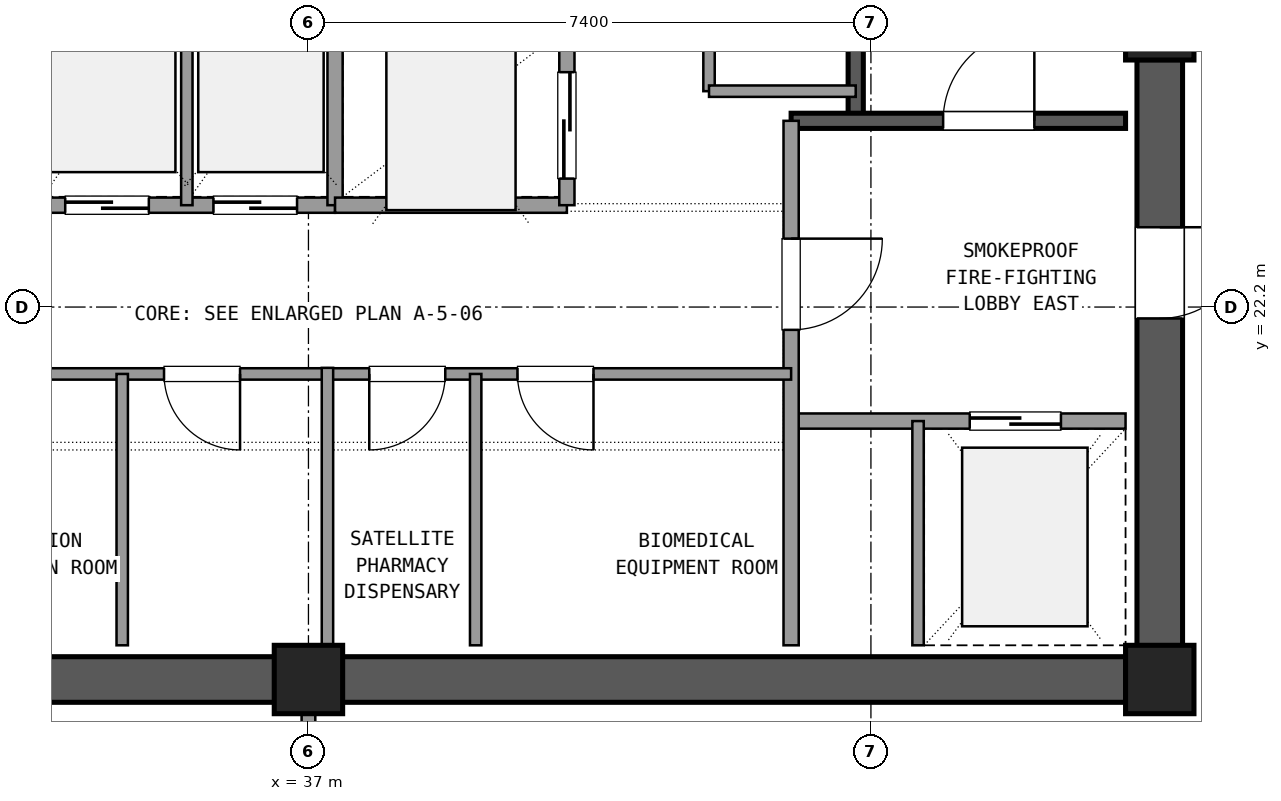
"""IFC4 building model, lengths in metres.
Left out: names, types, materials, properties, quantities, classifications, styles, units other than length and angle.
Written with IfcOpenShell. Run it as: python <this file> out.ifc"""

import sys

from ifc_helpers import new_model, si_unit, direction, frame, frame_2d, origin, origin_2d, place, context, subcontext, project, spatial, rectangle, extrude, element, fill, save


model = new_model("IFC4")
c1 = context("Model", 3, precision=1e-05, world=origin(), true_north=direction((0.0, 1.0)))
c2 = subcontext(c1, "Body", "Model", "MODEL_VIEW")
j1 = project(units=[si_unit("LENGTHUNIT", "METRE"), si_unit("PLANEANGLEUNIT", "RADIAN")], contexts=[c1])
p1 = place(None, origin())
s1 = spatial("IfcSite", under=j1, at=p1, CompositionType="ELEMENT")
p2 = place(p1, origin())
s2 = spatial("IfcBuilding", under=s1, at=p2, CompositionType="ELEMENT")
p3 = place(p2, frame((0.0, 0.0, 246.42)))
s3 = spatial("IfcBuildingStorey", under=s2, at=p3, CompositionType="ELEMENT", Elevation=246.42)
for number, where, z_axis, x_axis in (
    (1, (37.0, 17.3, 0.0), (0.0, 0.0, 1.0), (1.0, 0.0, 0.0)),
    (2, (48.2, 17.3, 0.0), (0.0, 0.0, 1.0), (1.0, 0.0, 0.0)),
    (3, (48.2, 25.9, 0.0), (0.0, 0.0, 1.0), (1.0, 0.0, 0.0)),
):
    element("IfcColumn", number, at=place(p3, frame(where, z_axis=z_axis, x_axis=x_axis)), inside=s3, PredefinedType="COLUMN", context=c2, shape_type="SweptSolid", body=[
        extrude(rectangle(XDim=0.9, YDim=0.9, at=origin_2d()), origin(), (0.0, 0.0, 1.0), 3.6),
    ])
for number, where, z_axis, x_axis in (
    (4, (26.245, 17.3, 0.0), (0.0, 0.0, 1.0), (1.0, 0.0, 0.0)),
    (5, (37.445, 17.3, 0.0), (0.0, 0.0, 1.0), (1.0, 0.0, 0.0)),
):
    element("IfcWall", number, at=place(p3, frame(where, z_axis=z_axis, x_axis=x_axis)), inside=s3, PredefinedType="SHEAR", context=c2, shape_type="SweptSolid", body=[
        extrude(rectangle(XDim=10.31, YDim=0.6, at=frame_2d((5.155, 0.0))), origin(), (0.0, 0.0, 1.0), 3.32),
    ])
p4 = place(p3, frame((48.2, 17.745, 0.0), z_axis=(0.0, 0.0, 1.0), x_axis=(0.0, 1.0, 0.0)))
e6 = element("IfcWall", 6, at=p4, inside=s3, PredefinedType="SHEAR", context=c2, shape_type="SweptSolid", body=[
    extrude(rectangle(XDim=7.71, YDim=0.6, at=frame_2d((3.855, 0.0))), origin(), (0.0, 0.0, 1.0), 3.32),
])
p5 = place(p4, frame((4.305, 0.0, 0.0)))
e7 = element("IfcOpeningElement", 7, at=p5, cuts=e6, PredefinedType="OPENING", context=c2, shape_type="SweptSolid", body=[
    extrude(rectangle(XDim=1.2, YDim=2.15, at=frame_2d((0.6, 1.075))), frame((0.0, 0.31, 0.0), z_axis=(0.0, -1.0, 0.0), x_axis=(1.0, 0.0, 0.0)), (0.0, 0.0, 1.0), 0.62),
])
p6 = place(p3, frame((44.2, 24.65, 0.0), z_axis=(0.0, 0.0, 1.0), x_axis=(0.0, 1.0, 0.0)))
e8 = element("IfcWall", 8, at=p6, inside=s3, PredefinedType="SHEAR", context=c2, shape_type="SweptSolid", body=[
    extrude(rectangle(XDim=9.4, YDim=0.2, at=frame_2d((4.7, 0.0))), origin(), (0.0, 0.0, 1.0), 3.32),
])
p7 = place(p3, frame((43.35, 24.65, 0.0), z_axis=(0.0, 0.0, 1.0), x_axis=(1.0, 0.0, 0.0)))
e9 = element("IfcWall", 9, at=p7, inside=s3, PredefinedType="SHEAR", context=c2, shape_type="SweptSolid", body=[
    extrude(rectangle(XDim=4.4, YDim=0.2, at=frame_2d((2.2, 0.0))), origin(), (0.0, 0.0, 1.0), 3.32),
])
p8 = place(p7, frame((2.0, 0.0, 0.0)))
e10 = element("IfcOpeningElement", 10, at=p8, cuts=e9, PredefinedType="OPENING", context=c2, shape_type="SweptSolid", body=[
    extrude(rectangle(XDim=1.2, YDim=2.15, at=frame_2d((0.6, 1.075))), frame((0.0, 0.11, 0.0), z_axis=(0.0, -1.0, 0.0), x_axis=(1.0, 0.0, 0.0)), (0.0, 0.0, 1.0), 0.22),
])
p9 = place(p3, frame((43.35, 20.7, 0.0), z_axis=(0.0, 0.0, 1.0), x_axis=(1.0, 0.0, 0.0)))
e11 = element("IfcWall", 11, at=p9, inside=s3, PredefinedType="SOLIDWALL", context=c2, shape_type="SweptSolid", body=[
    extrude(rectangle(XDim=4.4, YDim=0.2, at=frame_2d((2.2, 0.0))), origin(), (0.0, 0.0, 1.0), 2.61),
])
p10 = place(p9, frame((2.35, 0.0, 0.0)))
e12 = element("IfcOpeningElement", 12, at=p10, cuts=e11, PredefinedType="OPENING", context=c2, shape_type="SweptSolid", body=[
    extrude(rectangle(XDim=1.2, YDim=2.15, at=frame_2d((0.6, 1.075))), frame((0.0, 0.11, 0.0), z_axis=(0.0, -1.0, 0.0), x_axis=(1.0, 0.0, 0.0)), (0.0, 0.0, 1.0), 0.22),
])
p11 = place(p3, frame((43.35, 17.75, 0.0), z_axis=(0.0, 0.0, 1.0), x_axis=(0.0, 1.0, 0.0)))
e13 = element("IfcWall", 13, at=p11, inside=s3, PredefinedType="SOLIDWALL", context=c2, shape_type="SweptSolid", body=[
    extrude(rectangle(XDim=6.9, YDim=0.2, at=frame_2d((3.45, 0.0))), origin(), (0.0, 0.0, 1.0), 2.61),
])
p12 = place(p11, frame((4.15, 0.0, 0.0)))
e14 = element("IfcOpeningElement", 14, at=p12, cuts=e13, PredefinedType="OPENING", context=c2, shape_type="SweptSolid", body=[
    extrude(rectangle(XDim=1.2, YDim=2.15, at=frame_2d((0.6, 1.075))), frame((0.0, 0.11, 0.0), z_axis=(0.0, -1.0, 0.0), x_axis=(1.0, 0.0, 0.0)), (0.0, 0.0, 1.0), 0.22),
])
p13 = place(p3, frame((45.02, 17.75, 0.0), z_axis=(0.0, 0.0, 1.0), x_axis=(0.0, 1.0, 0.0)))
e15 = element("IfcWall", 15, at=p13, inside=s3, PredefinedType="PARTITIONING", context=c2, shape_type="SweptSolid", body=[
    extrude(rectangle(XDim=2.95, YDim=0.15, at=frame_2d((1.475, 0.0))), origin(), (0.0, 0.0, 1.0), 2.61),
])
p14 = place(p3, frame((30.25, 21.32, 0.0), z_axis=(0.0, 0.0, 1.0), x_axis=(1.0, 0.0, 0.0)))
e16 = element("IfcWall", 16, at=p14, inside=s3, PredefinedType="PARTITIONING", context=c2, shape_type="SweptSolid", body=[
    extrude(rectangle(XDim=7.0, YDim=0.15, at=frame_2d((3.5, 0.0))), origin(), (0.0, 0.0, 1.0), 2.61),
])
p15 = place(p14, frame((0.7, 0.0, 0.0)))
e17 = element("IfcOpeningElement", 17, at=p15, cuts=e16, PredefinedType="OPENING", context=c2, shape_type="SweptSolid", body=[
    extrude(rectangle(XDim=1.0, YDim=2.15, at=frame_2d((0.5, 1.075))), frame((0.0, 0.085, 0.0), z_axis=(0.0, -1.0, 0.0), x_axis=(1.0, 0.0, 0.0)), (0.0, 0.0, 1.0), 0.17),
])
p16 = place(p14, frame((4.85, 0.0, 0.0)))
e18 = element("IfcOpeningElement", 18, at=p16, cuts=e16, PredefinedType="OPENING", context=c2, shape_type="SweptSolid", body=[
    extrude(rectangle(XDim=1.0, YDim=2.15, at=frame_2d((0.5, 1.075))), frame((0.0, 0.085, 0.0), z_axis=(0.0, -1.0, 0.0), x_axis=(1.0, 0.0, 0.0)), (0.0, 0.0, 1.0), 0.17),
])
p17 = place(p3, frame((34.55, 17.75, 0.0), z_axis=(0.0, 0.0, 1.0), x_axis=(0.0, 1.0, 0.0)))
e19 = element("IfcWall", 19, at=p17, inside=s3, PredefinedType="PARTITIONING", context=c2, shape_type="SweptSolid", body=[
    extrude(rectangle(XDim=3.57, YDim=0.15, at=frame_2d((1.785, 0.0))), origin(), (0.0, 0.0, 1.0), 2.61),
])
p18 = place(p3, frame((37.25, 21.32, 0.0), z_axis=(0.0, 0.0, 1.0), x_axis=(1.0, 0.0, 0.0)))
e20 = element("IfcWall", 20, at=p18, inside=s3, PredefinedType="PARTITIONING", context=c2, shape_type="SweptSolid", body=[
    extrude(rectangle(XDim=6.1, YDim=0.15, at=frame_2d((3.05, 0.0))), origin(), (0.0, 0.0, 1.0), 2.61),
])
p19 = place(p18, frame((0.55, 0.0, 0.0)))
e21 = element("IfcOpeningElement", 21, at=p19, cuts=e20, PredefinedType="OPENING", context=c2, shape_type="SweptSolid", body=[
    extrude(rectangle(XDim=1.0, YDim=2.15, at=frame_2d((0.5, 1.075))), frame((0.0, 0.085, 0.0), z_axis=(0.0, -1.0, 0.0), x_axis=(1.0, 0.0, 0.0)), (0.0, 0.0, 1.0), 0.17),
])
p20 = place(p18, frame((2.5, 0.0, 0.0)))
e22 = element("IfcOpeningElement", 22, at=p20, cuts=e20, PredefinedType="OPENING", context=c2, shape_type="SweptSolid", body=[
    extrude(rectangle(XDim=1.0, YDim=2.15, at=frame_2d((0.5, 1.075))), frame((0.0, 0.085, 0.0), z_axis=(0.0, -1.0, 0.0), x_axis=(1.0, 0.0, 0.0)), (0.0, 0.0, 1.0), 0.17),
])
p21 = place(p3, frame((39.2, 17.75, 0.0), z_axis=(0.0, 0.0, 1.0), x_axis=(0.0, 1.0, 0.0)))
e23 = element("IfcWall", 23, at=p21, inside=s3, PredefinedType="PARTITIONING", context=c2, shape_type="SweptSolid", body=[
    extrude(rectangle(XDim=3.57, YDim=0.15, at=frame_2d((1.785, 0.0))), origin(), (0.0, 0.0, 1.0), 2.61),
])
p22 = place(p3, frame((37.25, 17.75, 0.0), z_axis=(0.0, 0.0, 1.0), x_axis=(0.0, 1.0, 0.0)))
e24 = element("IfcWall", 24, at=p22, inside=s3, PredefinedType="PARTITIONING", context=c2, shape_type="SweptSolid", body=[
    extrude(rectangle(XDim=3.65, YDim=0.15, at=frame_2d((1.825, 0.0))), origin(), (0.0, 0.0, 1.0), 2.61),
])
p23 = place(p3, frame((31.45, 23.54, 0.0), z_axis=(0.0, 0.0, 1.0), x_axis=(1.0, 0.0, 0.0)))
e25 = element("IfcWall", 25, at=p23, inside=s3, PredefinedType="SOLIDWALL", context=c2, shape_type="SweptSolid", body=[
    extrude(rectangle(XDim=5.9, YDim=0.2, at=frame_2d((2.95, 0.0))), origin(), (0.0, 0.0, 1.0), 2.61),
])
p24 = place(p23, frame((0.4, 0.0, 0.0)))
e26 = element("IfcOpeningElement", 26, at=p24, cuts=e25, PredefinedType="OPENING", context=c2, shape_type="SweptSolid", body=[
    extrude(rectangle(XDim=1.1, YDim=2.15, at=frame_2d((0.55, 1.075))), frame((0.0, 0.11, 0.0), z_axis=(0.0, -1.0, 0.0), x_axis=(1.0, 0.0, 0.0)), (0.0, 0.0, 1.0), 0.22),
])
p25 = place(p23, frame((2.35, 0.0, 0.0)))
e27 = element("IfcOpeningElement", 27, at=p25, cuts=e25, PredefinedType="OPENING", context=c2, shape_type="SweptSolid", body=[
    extrude(rectangle(XDim=1.1, YDim=2.15, at=frame_2d((0.55, 1.075))), frame((0.0, 0.11, 0.0), z_axis=(0.0, -1.0, 0.0), x_axis=(1.0, 0.0, 0.0)), (0.0, 0.0, 1.0), 0.22),
])
p26 = place(p23, frame((4.3, 0.0, 0.0)))
e28 = element("IfcOpeningElement", 28, at=p26, cuts=e25, PredefinedType="OPENING", context=c2, shape_type="SweptSolid", body=[
    extrude(rectangle(XDim=1.1, YDim=2.15, at=frame_2d((0.55, 1.075))), frame((0.0, 0.11, 0.0), z_axis=(0.0, -1.0, 0.0), x_axis=(1.0, 0.0, 0.0)), (0.0, 0.0, 1.0), 0.22),
])
p27 = place(p3, frame((35.4, 23.54, 0.0), z_axis=(0.0, 0.0, 1.0), x_axis=(0.0, 1.0, 0.0)))
e29 = element("IfcWall", 29, at=p27, inside=s3, PredefinedType="PARTITIONING", context=c2, shape_type="SweptSolid", body=[
    extrude(rectangle(XDim=2.81, YDim=0.15, at=frame_2d((1.405, 0.0))), origin(), (0.0, 0.0, 1.0), 2.61),
])
p28 = place(p3, frame((37.35, 23.54, 0.0), z_axis=(0.0, 0.0, 1.0), x_axis=(0.0, 1.0, 0.0)))
e30 = element("IfcWall", 30, at=p28, inside=s3, PredefinedType="SOLIDWALL", context=c2, shape_type="SweptSolid", body=[
    extrude(rectangle(XDim=6.82, YDim=0.2, at=frame_2d((3.41, 0.0))), origin(), (0.0, 0.0, 1.0), 2.61),
])
p29 = place(p3, frame((37.35, 23.54, 0.0), z_axis=(0.0, 0.0, 1.0), x_axis=(1.0, 0.0, 0.0)))
e31 = element("IfcWall", 31, at=p29, inside=s3, PredefinedType="SOLIDWALL", context=c2, shape_type="SweptSolid", body=[
    extrude(rectangle(XDim=3.05, YDim=0.2, at=frame_2d((1.525, 0.0))), origin(), (0.0, 0.0, 1.0), 2.61),
])
p30 = place(p3, frame((40.4, 23.54, 0.0), z_axis=(0.0, 0.0, 1.0), x_axis=(0.0, 1.0, 0.0)))
e32 = element("IfcWall", 32, at=p30, inside=s3, PredefinedType="SOLIDWALL", context=c2, shape_type="SweptSolid", body=[
    extrude(rectangle(XDim=6.82, YDim=0.2, at=frame_2d((3.41, 0.0))), origin(), (0.0, 0.0, 1.0), 2.61),
])
p31 = place(p30, frame((0.35, 0.0, 0.0)))
e33 = element("IfcOpeningElement", 33, at=p31, cuts=e32, PredefinedType="OPENING", context=c2, shape_type="SweptSolid", body=[
    extrude(rectangle(XDim=1.4, YDim=2.2, at=frame_2d((0.7, 1.1))), frame((0.0, 0.11, 0.0), z_axis=(0.0, -1.0, 0.0), x_axis=(1.0, 0.0, 0.0)), (0.0, 0.0, 1.0), 0.22),
])
p32 = place(p30, frame((2.65, 0.0, 0.0)))
e34 = element("IfcOpeningElement", 34, at=p32, cuts=e32, PredefinedType="OPENING", context=c2, shape_type="SweptSolid", body=[
    extrude(rectangle(XDim=1.4, YDim=2.2, at=frame_2d((0.7, 1.1))), frame((0.0, 0.11, 0.0), z_axis=(0.0, -1.0, 0.0), x_axis=(1.0, 0.0, 0.0)), (0.0, 0.0, 1.0), 0.22),
])
p33 = place(p30, frame((4.85, 0.0, 0.0)))
e35 = element("IfcOpeningElement", 35, at=p33, cuts=e32, PredefinedType="OPENING", context=c2, shape_type="SweptSolid", body=[
    extrude(rectangle(XDim=1.4, YDim=2.2, at=frame_2d((0.7, 1.1))), frame((0.0, 0.11, 0.0), z_axis=(0.0, -1.0, 0.0), x_axis=(1.0, 0.0, 0.0)), (0.0, 0.0, 1.0), 0.22),
])
p34 = place(p3, frame((42.27, 25.04, 0.0), z_axis=(0.0, 0.0, 1.0), x_axis=(0.0, 1.0, 0.0)))
e36 = element("IfcWall", 36, at=p34, inside=s3, PredefinedType="PARTITIONING", context=c2, shape_type="SweptSolid", body=[
    extrude(rectangle(XDim=4.82, YDim=0.15, at=frame_2d((2.41, 0.0))), origin(), (0.0, 0.0, 1.0), 2.61),
])
p35 = place(p34, frame((0.55, 0.0, 0.0)))
e37 = element("IfcOpeningElement", 37, at=p35, cuts=e36, PredefinedType="OPENING", context=c2, shape_type="SweptSolid", body=[
    extrude(rectangle(XDim=1.0, YDim=2.15, at=frame_2d((0.5, 1.075))), frame((0.0, 0.085, 0.0), z_axis=(0.0, -1.0, 0.0), x_axis=(1.0, 0.0, 0.0)), (0.0, 0.0, 1.0), 0.17),
])
p36 = place(p3, frame((42.27, 25.04, 0.0), z_axis=(0.0, 0.0, 1.0), x_axis=(1.0, 0.0, 0.0)))
e38 = element("IfcWall", 38, at=p36, inside=s3, PredefinedType="PARTITIONING", context=c2, shape_type="SweptSolid", body=[
    extrude(rectangle(XDim=1.93, YDim=0.15, at=frame_2d((0.965, 0.0))), origin(), (0.0, 0.0, 1.0), 2.61),
])
p37 = place(p3, frame((37.0, 14.15, 0.0), z_axis=(0.0, 0.0, 1.0), x_axis=(0.0, 1.0, 0.0)))
e39 = element("IfcWall", 39, at=p37, inside=s3, PredefinedType="PARTITIONING", context=c2, shape_type="SweptSolid", body=[
    extrude(rectangle(XDim=2.7, YDim=0.18, at=frame_2d((1.35, 0.0))), origin(), (0.0, 0.0, 1.0), 2.61),
])
p38 = place(p37, frame((0.35, 0.0, 0.0)))
e40 = element("IfcOpeningElement", 40, at=p38, cuts=e39, PredefinedType="OPENING", context=c2, shape_type="SweptSolid", body=[
    extrude(rectangle(XDim=2.0, YDim=2.2, at=frame_2d((1.0, 1.1))), frame((0.0, 0.1, 0.0), z_axis=(0.0, -1.0, 0.0), x_axis=(1.0, 0.0, 0.0)), (0.0, 0.0, 1.0), 0.2),
])
p39 = place(p8, origin())
e41 = element("IfcDoor", 41, at=p39, inside=s3, OperationType="SINGLE_SWING_RIGHT", PredefinedType="DOOR", context=c2, shape_type="SweptSolid", body=[
    extrude(rectangle(XDim=1.2, YDim=2.15, at=frame_2d((0.6, 1.075))), frame((0.0, 0.025, 0.0), z_axis=(0.0, -1.0, 0.0), x_axis=(1.0, 0.0, 0.0)), (0.0, 0.0, 1.0), 0.05),
])
fill(e10, e41)
p40 = place(p10, origin())
e42 = element("IfcDoor", 42, at=p40, inside=s3, OperationType="SLIDING_TO_RIGHT", PredefinedType="DOOR", context=c2, shape_type="SweptSolid", body=[
    extrude(rectangle(XDim=1.2, YDim=2.15, at=frame_2d((0.6, 1.075))), frame((0.0, 0.025, 0.0), z_axis=(0.0, -1.0, 0.0), x_axis=(1.0, 0.0, 0.0)), (0.0, 0.0, 1.0), 0.05),
])
fill(e12, e42)
p41 = place(p12, frame((1.2, 0.0, 0.0), z_axis=(0.0, 0.0, 1.0), x_axis=(-1.0, 0.0, 0.0)))
e43 = element("IfcDoor", 43, at=p41, inside=s3, OperationType="SINGLE_SWING_RIGHT", PredefinedType="DOOR", context=c2, shape_type="SweptSolid", body=[
    extrude(rectangle(XDim=1.2, YDim=2.15, at=frame_2d((0.6, 1.075))), frame((0.0, 0.025, 0.0), z_axis=(0.0, -1.0, 0.0), x_axis=(1.0, 0.0, 0.0)), (0.0, 0.0, 1.0), 0.05),
])
fill(e14, e43)
p42 = place(p5, frame((1.2, 0.0, 0.0), z_axis=(0.0, 0.0, 1.0), x_axis=(-1.0, 0.0, 0.0)))
e44 = element("IfcDoor", 44, at=p42, inside=s3, OperationType="SINGLE_SWING_RIGHT", PredefinedType="DOOR", context=c2, shape_type="SweptSolid", body=[
    extrude(rectangle(XDim=1.2, YDim=2.15, at=frame_2d((0.6, 1.075))), frame((0.0, 0.025, 0.0), z_axis=(0.0, -1.0, 0.0), x_axis=(1.0, 0.0, 0.0)), (0.0, 0.0, 1.0), 0.05),
])
fill(e7, e44)
p43 = place(p16, frame((1.0, 0.0, 0.0), z_axis=(0.0, 0.0, 1.0), x_axis=(-1.0, 0.0, 0.0)))
e45 = element("IfcDoor", 45, at=p43, inside=s3, OperationType="SINGLE_SWING_RIGHT", PredefinedType="DOOR", context=c2, shape_type="SweptSolid", body=[
    extrude(rectangle(XDim=1.0, YDim=2.15, at=frame_2d((0.5, 1.075))), frame((0.0, 0.025, 0.0), z_axis=(0.0, -1.0, 0.0), x_axis=(1.0, 0.0, 0.0)), (0.0, 0.0, 1.0), 0.05),
])
fill(e18, e45)
p44 = place(p19, frame((1.0, 0.0, 0.0), z_axis=(0.0, 0.0, 1.0), x_axis=(-1.0, 0.0, 0.0)))
e46 = element("IfcDoor", 46, at=p44, inside=s3, OperationType="SINGLE_SWING_LEFT", PredefinedType="DOOR", context=c2, shape_type="SweptSolid", body=[
    extrude(rectangle(XDim=1.0, YDim=2.15, at=frame_2d((0.5, 1.075))), frame((0.0, 0.025, 0.0), z_axis=(0.0, -1.0, 0.0), x_axis=(1.0, 0.0, 0.0)), (0.0, 0.0, 1.0), 0.05),
])
fill(e21, e46)
p45 = place(p20, frame((1.0, 0.0, 0.0), z_axis=(0.0, 0.0, 1.0), x_axis=(-1.0, 0.0, 0.0)))
e47 = element("IfcDoor", 47, at=p45, inside=s3, OperationType="SINGLE_SWING_RIGHT", PredefinedType="DOOR", context=c2, shape_type="SweptSolid", body=[
    extrude(rectangle(XDim=1.0, YDim=2.15, at=frame_2d((0.5, 1.075))), frame((0.0, 0.025, 0.0), z_axis=(0.0, -1.0, 0.0), x_axis=(1.0, 0.0, 0.0)), (0.0, 0.0, 1.0), 0.05),
])
fill(e22, e47)
p46 = place(p25, origin())
e48 = element("IfcDoor", 48, at=p46, inside=s3, OperationType="SLIDING_TO_RIGHT", PredefinedType="DOOR", context=c2, shape_type="SweptSolid", body=[
    extrude(rectangle(XDim=1.1, YDim=2.15, at=frame_2d((0.55, 1.075))), frame((0.0, 0.025, 0.0), z_axis=(0.0, -1.0, 0.0), x_axis=(1.0, 0.0, 0.0)), (0.0, 0.0, 1.0), 0.05),
])
fill(e27, e48)
p47 = place(p26, origin())
e49 = element("IfcDoor", 49, at=p47, inside=s3, OperationType="SLIDING_TO_RIGHT", PredefinedType="DOOR", context=c2, shape_type="SweptSolid", body=[
    extrude(rectangle(XDim=1.1, YDim=2.15, at=frame_2d((0.55, 1.075))), frame((0.0, 0.025, 0.0), z_axis=(0.0, -1.0, 0.0), x_axis=(1.0, 0.0, 0.0)), (0.0, 0.0, 1.0), 0.05),
])
fill(e28, e49)
p48 = place(p31, origin())
e50 = element("IfcDoor", 50, at=p48, inside=s3, OperationType="SLIDING_TO_LEFT", PredefinedType="DOOR", context=c2, shape_type="SweptSolid", body=[
    extrude(rectangle(XDim=1.4, YDim=2.2, at=frame_2d((0.7, 1.1))), frame((0.0, 0.025, 0.0), z_axis=(0.0, -1.0, 0.0), x_axis=(1.0, 0.0, 0.0)), (0.0, 0.0, 1.0), 0.05),
])
fill(e33, e50)
save(model, sys.argv[1])
